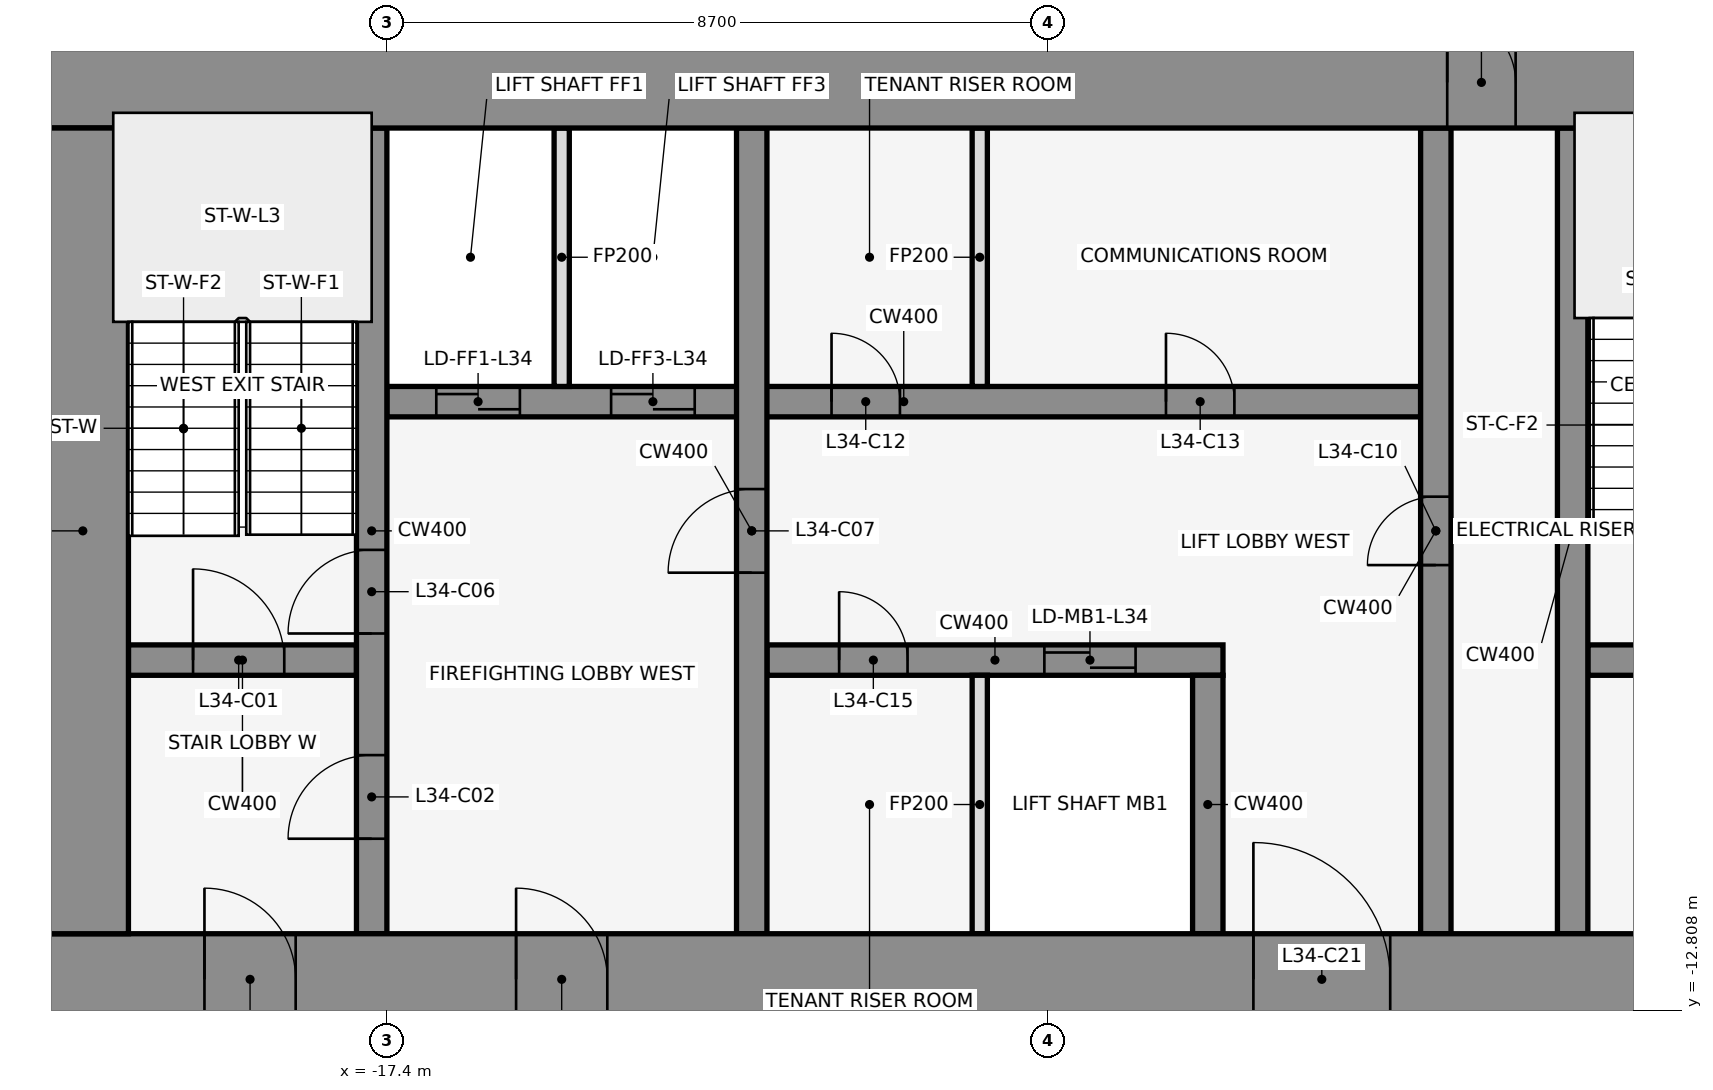
"""IFC4 building model, lengths in metres.
Left out: names, types, materials, properties, quantities, classifications, styles, units other than length and angle.
Written with IfcOpenShell. Run it as: python <this file> out.ifc"""

import sys

from ifc_helpers import new_model, si_unit, direction, frame, frame_2d, origin, place, context, subcontext, project, spatial, rectangle, extrude, element, fill, save


model = new_model("IFC4")
c1 = context("Model", 3, precision=1e-05, world=origin(), true_north=direction((0.0, 1.0)))
c2 = subcontext(c1, "Body", "Model", "MODEL_VIEW")
j1 = project(units=[si_unit("LENGTHUNIT", "METRE"), si_unit("PLANEANGLEUNIT", "RADIAN")], contexts=[c1])
p1 = place(None, origin())
s1 = spatial("IfcSite", under=j1, at=p1, CompositionType="ELEMENT")
p2 = place(p1, origin())
s2 = spatial("IfcBuilding", under=s1, at=p2, CompositionType="ELEMENT")
p3 = place(p2, frame((0.0, 0.0, 156.8)))
s3 = spatial("IfcBuildingStorey", under=s2, at=p3, CompositionType="ELEMENT", Elevation=156.8)
for number, where, z_axis, x_axis in (
    (1, (-0.068, -0.105, 0.0), (0.0, 0.0, 1.0), (-0.84, 0.543, 0.0)),
    (2, (-14.599, 1.08, 0.0), (0.0, 0.0, 1.0), (-0.84, -0.543, 0.0)),
):
    element("IfcWall", number, at=place(p3, frame(where, z_axis=z_axis, x_axis=x_axis)), inside=s3, PredefinedType="STANDARD", context=c2, shape_type="SweptSolid", body=[
        extrude(rectangle(XDim=2.183, YDim=0.25, at=frame_2d((1.091, 0.0))), origin(), (0.0, 0.0, 1.0), 3.95),
    ])
p4 = place(p3, frame((-20.8, -8.2, 0.0), z_axis=(0.0, 0.0, 1.0), x_axis=(1.0, 0.0, 0.0)))
e3 = element("IfcWall", 3, at=p4, inside=s3, PredefinedType="SHEAR", context=c2, shape_type="SweptSolid", body=[
    extrude(rectangle(XDim=3.0, YDim=0.4, at=frame_2d((1.5, 0.0))), origin(), (0.0, 0.0, 1.0), 4.1),
])
p5 = place(p4, frame((0.85, 0.0, 0.0)))
e4 = element("IfcOpeningElement", 4, at=p5, cuts=e3, PredefinedType="OPENING", context=c2, shape_type="SweptSolid", body=[
    extrude(rectangle(XDim=1.2, YDim=2.1, at=frame_2d((0.6, 1.05))), frame((0.0, 0.212, 0.0), z_axis=(0.0, -1.0, 0.0), x_axis=(1.0, 0.0, 0.0)), (0.0, 0.0, 1.0), 0.424),
])
p6 = place(p3, frame((-12.4, -8.2, 0.0), z_axis=(0.0, 0.0, 1.0), x_axis=(1.0, 0.0, 0.0)))
e5 = element("IfcWall", 5, at=p6, inside=s3, PredefinedType="SHEAR", context=c2, shape_type="SweptSolid", body=[
    extrude(rectangle(XDim=6.0, YDim=0.4, at=frame_2d((3.0, 0.0))), origin(), (0.0, 0.0, 1.0), 4.1),
])
p7 = place(p6, frame((3.65, 0.0, 0.0)))
e6 = element("IfcOpeningElement", 6, at=p7, cuts=e5, PredefinedType="OPENING", context=c2, shape_type="SweptSolid", body=[
    extrude(rectangle(XDim=1.2, YDim=2.1, at=frame_2d((0.6, 1.05))), frame((0.0, 0.212, 0.0), z_axis=(0.0, -1.0, 0.0), x_axis=(1.0, 0.0, 0.0)), (0.0, 0.0, 1.0), 0.424),
])
p8 = place(p6, frame((0.95, 0.0, 0.0)))
e7 = element("IfcOpeningElement", 7, at=p8, cuts=e5, PredefinedType="OPENING", context=c2, shape_type="SweptSolid", body=[
    extrude(rectangle(XDim=0.9, YDim=2.1, at=frame_2d((0.45, 1.05))), frame((0.0, 0.212, 0.0), z_axis=(0.0, -1.0, 0.0), x_axis=(1.0, 0.0, 0.0)), (0.0, 0.0, 1.0), 0.424),
])
p9 = place(p3, frame((-1.6, -8.2, 0.0), z_axis=(0.0, 0.0, 1.0), x_axis=(1.0, 0.0, 0.0)))
e8 = element("IfcWall", 8, at=p9, inside=s3, PredefinedType="SHEAR", context=c2, shape_type="SweptSolid", body=[
    extrude(rectangle(XDim=3.2, YDim=0.4, at=frame_2d((1.6, 0.0))), origin(), (0.0, 0.0, 1.0), 4.1),
])
p10 = place(p9, frame((1.05, 0.0, 0.0)))
e9 = element("IfcOpeningElement", 9, at=p10, cuts=e8, PredefinedType="OPENING", context=c2, shape_type="SweptSolid", body=[
    extrude(rectangle(XDim=1.2, YDim=2.1, at=frame_2d((0.6, 1.05))), frame((0.0, 0.212, 0.0), z_axis=(0.0, -1.0, 0.0), x_axis=(1.0, 0.0, 0.0)), (0.0, 0.0, 1.0), 0.424),
])
p11 = place(p3, frame((-17.4, -4.8, 0.0), z_axis=(0.0, 0.0, 1.0), x_axis=(1.0, 0.0, 0.0)))
e10 = element("IfcWall", 10, at=p11, inside=s3, PredefinedType="SHEAR", context=c2, shape_type="SweptSolid", body=[
    extrude(rectangle(XDim=13.6, YDim=0.4, at=frame_2d((6.8, 0.0))), origin(), (0.0, 0.0, 1.0), 4.1),
])
p12 = place(p11, frame((0.65, 0.0, 0.0)))
e11 = element("IfcOpeningElement", 11, at=p12, cuts=e10, PredefinedType="OPENING", context=c2, shape_type="SweptSolid", body=[
    extrude(rectangle(XDim=1.1, YDim=2.1, at=frame_2d((0.55, 1.05))), frame((0.0, 0.212, 0.0), z_axis=(0.0, -1.0, 0.0), x_axis=(1.0, 0.0, 0.0)), (0.0, 0.0, 1.0), 0.424),
])
p13 = place(p11, frame((2.95, 0.0, 0.0)))
e12 = element("IfcOpeningElement", 12, at=p13, cuts=e10, PredefinedType="OPENING", context=c2, shape_type="SweptSolid", body=[
    extrude(rectangle(XDim=1.1, YDim=2.1, at=frame_2d((0.55, 1.05))), frame((0.0, 0.212, 0.0), z_axis=(0.0, -1.0, 0.0), x_axis=(1.0, 0.0, 0.0)), (0.0, 0.0, 1.0), 0.424),
])
p14 = place(p11, frame((5.85, 0.0, 0.0)))
e13 = element("IfcOpeningElement", 13, at=p14, cuts=e10, PredefinedType="OPENING", context=c2, shape_type="SweptSolid", body=[
    extrude(rectangle(XDim=0.9, YDim=2.1, at=frame_2d((0.45, 1.05))), frame((0.0, 0.212, 0.0), z_axis=(0.0, -1.0, 0.0), x_axis=(1.0, 0.0, 0.0)), (0.0, 0.0, 1.0), 0.424),
])
p15 = place(p11, frame((10.25, 0.0, 0.0)))
e14 = element("IfcOpeningElement", 14, at=p15, cuts=e10, PredefinedType="OPENING", context=c2, shape_type="SweptSolid", body=[
    extrude(rectangle(XDim=0.9, YDim=2.1, at=frame_2d((0.45, 1.05))), frame((0.0, 0.212, 0.0), z_axis=(0.0, -1.0, 0.0), x_axis=(1.0, 0.0, 0.0)), (0.0, 0.0, 1.0), 0.424),
])
p16 = place(p3, frame((-17.6, -11.8, 0.0), z_axis=(0.0, 0.0, 1.0), x_axis=(0.0, 1.0, 0.0)))
e15 = element("IfcWall", 15, at=p16, inside=s3, PredefinedType="SHEAR", context=c2, shape_type="SweptSolid", body=[
    extrude(rectangle(XDim=10.6, YDim=0.4, at=frame_2d((5.3, 0.0))), origin(), (0.0, 0.0, 1.0), 4.1),
])
p17 = place(p16, frame((1.25, 0.0, 0.0)))
e16 = element("IfcOpeningElement", 16, at=p17, cuts=e15, PredefinedType="OPENING", context=c2, shape_type="SweptSolid", body=[
    extrude(rectangle(XDim=1.1, YDim=2.1, at=frame_2d((0.55, 1.05))), frame((0.0, 0.212, 0.0), z_axis=(0.0, -1.0, 0.0), x_axis=(1.0, 0.0, 0.0)), (0.0, 0.0, 1.0), 0.424),
])
p18 = place(p16, frame((3.95, 0.0, 0.0)))
e17 = element("IfcOpeningElement", 17, at=p18, cuts=e15, PredefinedType="OPENING", context=c2, shape_type="SweptSolid", body=[
    extrude(rectangle(XDim=1.1, YDim=2.1, at=frame_2d((0.55, 1.05))), frame((0.0, 0.212, 0.0), z_axis=(0.0, -1.0, 0.0), x_axis=(1.0, 0.0, 0.0)), (0.0, 0.0, 1.0), 0.424),
])
p19 = place(p3, frame((-15.1, -4.6, 0.0), z_axis=(0.0, 0.0, 1.0), x_axis=(0.0, 1.0, 0.0)))
e18 = element("IfcWall", 18, at=p19, inside=s3, PredefinedType="PARTITIONING", context=c2, shape_type="SweptSolid", body=[
    extrude(rectangle(XDim=3.4, YDim=0.2, at=frame_2d((1.7, 0.0))), origin(), (0.0, 0.0, 1.0), 2.84),
])
p20 = place(p3, frame((-12.6, -11.8, 0.0), z_axis=(0.0, 0.0, 1.0), x_axis=(0.0, 1.0, 0.0)))
e19 = element("IfcWall", 19, at=p20, inside=s3, PredefinedType="SHEAR", context=c2, shape_type="SweptSolid", body=[
    extrude(rectangle(XDim=10.6, YDim=0.4, at=frame_2d((5.3, 0.0))), origin(), (0.0, 0.0, 1.0), 4.1),
])
p21 = place(p20, frame((4.75, 0.0, 0.0)))
e20 = element("IfcOpeningElement", 20, at=p21, cuts=e19, PredefinedType="OPENING", context=c2, shape_type="SweptSolid", body=[
    extrude(rectangle(XDim=1.1, YDim=2.1, at=frame_2d((0.55, 1.05))), frame((0.0, 0.212, 0.0), z_axis=(0.0, -1.0, 0.0), x_axis=(1.0, 0.0, 0.0)), (0.0, 0.0, 1.0), 0.424),
])
for number, where, z_axis, x_axis in (
    (21, (-9.6, -11.8, 0.0), (0.0, 0.0, 1.0), (0.0, 1.0, 0.0)),
    (22, (-9.6, -4.6, 0.0), (0.0, 0.0, 1.0), (0.0, 1.0, 0.0)),
):
    element("IfcWall", number, at=place(p3, frame(where, z_axis=z_axis, x_axis=x_axis)), inside=s3, PredefinedType="PARTITIONING", context=c2, shape_type="SweptSolid", body=[
        extrude(rectangle(XDim=3.4, YDim=0.2, at=frame_2d((1.7, 0.0))), origin(), (0.0, 0.0, 1.0), 2.84),
    ])
p22 = place(p3, frame((-6.6, -11.8, 0.0), z_axis=(0.0, 0.0, 1.0), x_axis=(0.0, 1.0, 0.0)))
e23 = element("IfcWall", 23, at=p22, inside=s3, PredefinedType="SHEAR", context=c2, shape_type="SweptSolid", body=[
    extrude(rectangle(XDim=3.4, YDim=0.4, at=frame_2d((1.7, 0.0))), origin(), (0.0, 0.0, 1.0), 4.1),
])
p23 = place(p3, frame((-3.6, -11.8, 0.0), z_axis=(0.0, 0.0, 1.0), x_axis=(0.0, 1.0, 0.0)))
e24 = element("IfcWall", 24, at=p23, inside=s3, PredefinedType="SHEAR", context=c2, shape_type="SweptSolid", body=[
    extrude(rectangle(XDim=10.6, YDim=0.4, at=frame_2d((5.3, 0.0))), origin(), (0.0, 0.0, 1.0), 4.1),
])
p24 = place(p23, frame((4.85, 0.0, 0.0)))
e25 = element("IfcOpeningElement", 25, at=p24, cuts=e24, PredefinedType="OPENING", context=c2, shape_type="SweptSolid", body=[
    extrude(rectangle(XDim=0.9, YDim=2.1, at=frame_2d((0.45, 1.05))), frame((0.0, 0.212, 0.0), z_axis=(0.0, -1.0, 0.0), x_axis=(1.0, 0.0, 0.0)), (0.0, 0.0, 1.0), 0.424),
])
p25 = place(p3, frame((-1.8, -11.8, 0.0), z_axis=(0.0, 0.0, 1.0), x_axis=(0.0, 1.0, 0.0)))
e26 = element("IfcWall", 26, at=p25, inside=s3, PredefinedType="SHEAR", context=c2, shape_type="SweptSolid", body=[
    extrude(rectangle(XDim=10.6, YDim=0.4, at=frame_2d((5.3, 0.0))), origin(), (0.0, 0.0, 1.0), 4.1),
])
p26 = place(p3, frame((-22.0, -0.6, 0.0), z_axis=(0.0, 0.0, 1.0), x_axis=(1.0, 0.0, 0.0)))
e27 = element("IfcWall", 27, at=p26, inside=s3, PredefinedType="SHEAR", context=c2, shape_type="SweptSolid", body=[
    extrude(rectangle(XDim=44.0, YDim=1.2, at=frame_2d((22.0, 0.0))), origin(), (0.0, 0.0, 1.0), 4.1),
])
p27 = place(p26, frame((18.55, 0.0, 0.0)))
e28 = element("IfcOpeningElement", 28, at=p27, cuts=e27, PredefinedType="OPENING", context=c2, shape_type="SweptSolid", body=[
    extrude(rectangle(XDim=0.9, YDim=2.1, at=frame_2d((0.45, 1.05))), frame((0.0, 0.612, 0.0), z_axis=(0.0, -1.0, 0.0), x_axis=(1.0, 0.0, 0.0)), (0.0, 0.0, 1.0), 1.224),
])
p28 = place(p26, frame((24.55, 0.0, 0.0)))
e29 = element("IfcOpeningElement", 29, at=p28, cuts=e27, PredefinedType="OPENING", context=c2, shape_type="SweptSolid", body=[
    extrude(rectangle(XDim=0.9, YDim=2.1, at=frame_2d((0.45, 1.05))), frame((0.0, 0.612, 0.0), z_axis=(0.0, -1.0, 0.0), x_axis=(1.0, 0.0, 0.0)), (0.0, 0.0, 1.0), 1.224),
])
p29 = place(p3, frame((-22.0, -12.4, 0.0), z_axis=(0.0, 0.0, 1.0), x_axis=(1.0, 0.0, 0.0)))
e30 = element("IfcWall", 30, at=p29, inside=s3, PredefinedType="SHEAR", context=c2, shape_type="SweptSolid", body=[
    extrude(rectangle(XDim=44.0, YDim=1.2, at=frame_2d((22.0, 0.0))), origin(), (0.0, 0.0, 1.0), 4.1),
])
p30 = place(p29, frame((2.2, 0.0, 0.0)))
e31 = element("IfcOpeningElement", 31, at=p30, cuts=e30, PredefinedType="OPENING", context=c2, shape_type="SweptSolid", body=[
    extrude(rectangle(XDim=1.2, YDim=2.1, at=frame_2d((0.6, 1.05))), frame((0.0, 0.612, 0.0), z_axis=(0.0, -1.0, 0.0), x_axis=(1.0, 0.0, 0.0)), (0.0, 0.0, 1.0), 1.224),
])
p31 = place(p29, frame((21.4, 0.0, 0.0)))
e32 = element("IfcOpeningElement", 32, at=p31, cuts=e30, PredefinedType="OPENING", context=c2, shape_type="SweptSolid", body=[
    extrude(rectangle(XDim=1.2, YDim=2.1, at=frame_2d((0.6, 1.05))), frame((0.0, 0.612, 0.0), z_axis=(0.0, -1.0, 0.0), x_axis=(1.0, 0.0, 0.0)), (0.0, 0.0, 1.0), 1.224),
])
p32 = place(p29, frame((40.6, 0.0, 0.0)))
e33 = element("IfcOpeningElement", 33, at=p32, cuts=e30, PredefinedType="OPENING", context=c2, shape_type="SweptSolid", body=[
    extrude(rectangle(XDim=1.2, YDim=2.1, at=frame_2d((0.6, 1.05))), frame((0.0, 0.612, 0.0), z_axis=(0.0, -1.0, 0.0), x_axis=(1.0, 0.0, 0.0)), (0.0, 0.0, 1.0), 1.224),
])
p33 = place(p29, frame((16.0, 0.0, 0.0)))
e34 = element("IfcOpeningElement", 34, at=p33, cuts=e30, PredefinedType="OPENING", context=c2, shape_type="SweptSolid", body=[
    extrude(rectangle(XDim=1.8, YDim=2.1, at=frame_2d((0.9, 1.05))), frame((0.0, 0.612, 0.0), z_axis=(0.0, -1.0, 0.0), x_axis=(1.0, 0.0, 0.0)), (0.0, 0.0, 1.0), 1.224),
])
p34 = place(p29, frame((6.3, 0.0, 0.0)))
e35 = element("IfcOpeningElement", 35, at=p34, cuts=e30, PredefinedType="OPENING", context=c2, shape_type="SweptSolid", body=[
    extrude(rectangle(XDim=1.2, YDim=2.1, at=frame_2d((0.6, 1.05))), frame((0.0, 0.612, 0.0), z_axis=(0.0, -1.0, 0.0), x_axis=(1.0, 0.0, 0.0)), (0.0, 0.0, 1.0), 1.224),
])
p35 = place(p29, frame((26.2, 0.0, 0.0)))
e36 = element("IfcOpeningElement", 36, at=p35, cuts=e30, PredefinedType="OPENING", context=c2, shape_type="SweptSolid", body=[
    extrude(rectangle(XDim=1.8, YDim=2.1, at=frame_2d((0.9, 1.05))), frame((0.0, 0.612, 0.0), z_axis=(0.0, -1.0, 0.0), x_axis=(1.0, 0.0, 0.0)), (0.0, 0.0, 1.0), 1.224),
])
p36 = place(p29, frame((36.5, 0.0, 0.0)))
e37 = element("IfcOpeningElement", 37, at=p36, cuts=e30, PredefinedType="OPENING", context=c2, shape_type="SweptSolid", body=[
    extrude(rectangle(XDim=1.2, YDim=2.1, at=frame_2d((0.6, 1.05))), frame((0.0, 0.612, 0.0), z_axis=(0.0, -1.0, 0.0), x_axis=(1.0, 0.0, 0.0)), (0.0, 0.0, 1.0), 1.224),
])
p37 = place(p3, frame((-21.4, -11.8, 0.0), z_axis=(0.0, 0.0, 1.0), x_axis=(0.0, 1.0, 0.0)))
e38 = element("IfcWall", 38, at=p37, inside=s3, PredefinedType="SHEAR", context=c2, shape_type="SweptSolid", body=[
    extrude(rectangle(XDim=10.6, YDim=1.2, at=frame_2d((5.3, 0.0))), origin(), (0.0, 0.0, 1.0), 4.1),
])
p38 = place(p5, origin())
e39 = element("IfcDoor", 39, at=p38, inside=s3, OperationType="SINGLE_SWING_LEFT", PredefinedType="DOOR", context=c2, shape_type="SweptSolid", body=[
    extrude(rectangle(XDim=1.2, YDim=2.1, at=frame_2d((0.6, 1.05))), frame((0.0, 0.025, 0.0), z_axis=(0.0, -1.0, 0.0), x_axis=(1.0, 0.0, 0.0)), (0.0, 0.0, 1.0), 0.05),
])
fill(e4, e39)
p39 = place(p17, frame((1.1, 0.0, 0.0), z_axis=(0.0, 0.0, 1.0), x_axis=(-1.0, 0.0, 0.0)))
e40 = element("IfcDoor", 40, at=p39, inside=s3, OperationType="SINGLE_SWING_LEFT", PredefinedType="DOOR", context=c2, shape_type="SweptSolid", body=[
    extrude(rectangle(XDim=1.1, YDim=2.1, at=frame_2d((0.55, 1.05))), frame((0.0, 0.025, 0.0), z_axis=(0.0, -1.0, 0.0), x_axis=(1.0, 0.0, 0.0)), (0.0, 0.0, 1.0), 0.05),
])
fill(e16, e40)
p40 = place(p12, origin())
e41 = element("IfcDoor", 41, at=p40, inside=s3, OperationType="DOUBLE_DOOR_SLIDING", PredefinedType="DOOR", context=c2, shape_type="SweptSolid", body=[
    extrude(rectangle(XDim=1.1, YDim=2.1, at=frame_2d((0.55, 1.05))), frame((0.0, 0.025, 0.0), z_axis=(0.0, -1.0, 0.0), x_axis=(1.0, 0.0, 0.0)), (0.0, 0.0, 1.0), 0.05),
])
fill(e11, e41)
p41 = place(p13, origin())
e42 = element("IfcDoor", 42, at=p41, inside=s3, OperationType="DOUBLE_DOOR_SLIDING", PredefinedType="DOOR", context=c2, shape_type="SweptSolid", body=[
    extrude(rectangle(XDim=1.1, YDim=2.1, at=frame_2d((0.55, 1.05))), frame((0.0, 0.025, 0.0), z_axis=(0.0, -1.0, 0.0), x_axis=(1.0, 0.0, 0.0)), (0.0, 0.0, 1.0), 0.05),
])
fill(e12, e42)
p42 = place(p7, origin())
e43 = element("IfcDoor", 43, at=p42, inside=s3, OperationType="DOUBLE_DOOR_SLIDING", PredefinedType="DOOR", context=c2, shape_type="SweptSolid", body=[
    extrude(rectangle(XDim=1.2, YDim=2.1, at=frame_2d((0.6, 1.05))), frame((0.0, 0.025, 0.0), z_axis=(0.0, -1.0, 0.0), x_axis=(1.0, 0.0, 0.0)), (0.0, 0.0, 1.0), 0.05),
])
fill(e6, e43)
p43 = place(p18, frame((1.1, 0.0, 0.0), z_axis=(0.0, 0.0, 1.0), x_axis=(-1.0, 0.0, 0.0)))
e44 = element("IfcDoor", 44, at=p43, inside=s3, OperationType="SINGLE_SWING_LEFT", PredefinedType="DOOR", context=c2, shape_type="SweptSolid", body=[
    extrude(rectangle(XDim=1.1, YDim=2.1, at=frame_2d((0.55, 1.05))), frame((0.0, 0.025, 0.0), z_axis=(0.0, -1.0, 0.0), x_axis=(1.0, 0.0, 0.0)), (0.0, 0.0, 1.0), 0.05),
])
fill(e17, e44)
p44 = place(p21, origin())
e45 = element("IfcDoor", 45, at=p44, inside=s3, OperationType="SINGLE_SWING_LEFT", PredefinedType="DOOR", context=c2, shape_type="SweptSolid", body=[
    extrude(rectangle(XDim=1.1, YDim=2.1, at=frame_2d((0.55, 1.05))), frame((0.0, 0.025, 0.0), z_axis=(0.0, -1.0, 0.0), x_axis=(1.0, 0.0, 0.0)), (0.0, 0.0, 1.0), 0.05),
])
fill(e20, e45)
p45 = place(p24, frame((0.9, 0.0, 0.0), z_axis=(0.0, 0.0, 1.0), x_axis=(-1.0, 0.0, 0.0)))
e46 = element("IfcDoor", 46, at=p45, inside=s3, OperationType="SINGLE_SWING_LEFT", PredefinedType="DOOR", context=c2, shape_type="SweptSolid", body=[
    extrude(rectangle(XDim=0.9, YDim=2.1, at=frame_2d((0.45, 1.05))), frame((0.0, 0.025, 0.0), z_axis=(0.0, -1.0, 0.0), x_axis=(1.0, 0.0, 0.0)), (0.0, 0.0, 1.0), 0.05),
])
fill(e25, e46)
p46 = place(p14, origin())
e47 = element("IfcDoor", 47, at=p46, inside=s3, OperationType="SINGLE_SWING_RIGHT", PredefinedType="DOOR", context=c2, shape_type="SweptSolid", body=[
    extrude(rectangle(XDim=0.9, YDim=2.1, at=frame_2d((0.45, 1.05))), frame((0.0, 0.025, 0.0), z_axis=(0.0, -1.0, 0.0), x_axis=(1.0, 0.0, 0.0)), (0.0, 0.0, 1.0), 0.05),
])
fill(e13, e47)
p47 = place(p15, origin())
e48 = element("IfcDoor", 48, at=p47, inside=s3, OperationType="SINGLE_SWING_LEFT", PredefinedType="DOOR", context=c2, shape_type="SweptSolid", body=[
    extrude(rectangle(XDim=0.9, YDim=2.1, at=frame_2d((0.45, 1.05))), frame((0.0, 0.025, 0.0), z_axis=(0.0, -1.0, 0.0), x_axis=(1.0, 0.0, 0.0)), (0.0, 0.0, 1.0), 0.05),
])
fill(e14, e48)
p48 = place(p8, frame((0.9, 0.0, 0.0), z_axis=(0.0, 0.0, 1.0), x_axis=(-1.0, 0.0, 0.0)))
e49 = element("IfcDoor", 49, at=p48, inside=s3, OperationType="SINGLE_SWING_RIGHT", PredefinedType="DOOR", context=c2, shape_type="SweptSolid", body=[
    extrude(rectangle(XDim=0.9, YDim=2.1, at=frame_2d((0.45, 1.05))), frame((0.0, 0.025, 0.0), z_axis=(0.0, -1.0, 0.0), x_axis=(1.0, 0.0, 0.0)), (0.0, 0.0, 1.0), 0.05),
])
fill(e7, e49)
p49 = place(p27, origin())
e50 = element("IfcDoor", 50, at=p49, inside=s3, OperationType="SINGLE_SWING_LEFT", PredefinedType="DOOR", context=c2, shape_type="SweptSolid", body=[
    extrude(rectangle(XDim=0.9, YDim=2.1, at=frame_2d((0.45, 1.05))), frame((0.0, 0.025, 0.0), z_axis=(0.0, -1.0, 0.0), x_axis=(1.0, 0.0, 0.0)), (0.0, 0.0, 1.0), 0.05),
])
fill(e28, e50)
p50 = place(p30, frame((1.2, 0.0, 0.0), z_axis=(0.0, 0.0, 1.0), x_axis=(-1.0, 0.0, 0.0)))
e51 = element("IfcDoor", 51, at=p50, inside=s3, OperationType="SINGLE_SWING_RIGHT", PredefinedType="DOOR", context=c2, shape_type="SweptSolid", body=[
    extrude(rectangle(XDim=1.2, YDim=2.1, at=frame_2d((0.6, 1.05))), frame((0.0, 0.025, 0.0), z_axis=(0.0, -1.0, 0.0), x_axis=(1.0, 0.0, 0.0)), (0.0, 0.0, 1.0), 0.05),
])
fill(e31, e51)
p51 = place(p33, origin())
e52 = element("IfcDoor", 52, at=p51, inside=s3, OperationType="SINGLE_SWING_LEFT", PredefinedType="DOOR", context=c2, shape_type="SweptSolid", body=[
    extrude(rectangle(XDim=1.8, YDim=2.1, at=frame_2d((0.9, 1.05))), frame((0.0, 0.025, 0.0), z_axis=(0.0, -1.0, 0.0), x_axis=(1.0, 0.0, 0.0)), (0.0, 0.0, 1.0), 0.05),
])
fill(e34, e52)
p52 = place(p34, frame((1.2, 0.0, 0.0), z_axis=(0.0, 0.0, 1.0), x_axis=(-1.0, 0.0, 0.0)))
e53 = element("IfcDoor", 53, at=p52, inside=s3, OperationType="SINGLE_SWING_RIGHT", PredefinedType="DOOR", context=c2, shape_type="SweptSolid", body=[
    extrude(rectangle(XDim=1.2, YDim=2.1, at=frame_2d((0.6, 1.05))), frame((0.0, 0.025, 0.0), z_axis=(0.0, -1.0, 0.0), x_axis=(1.0, 0.0, 0.0)), (0.0, 0.0, 1.0), 0.05),
])
fill(e35, e53)
save(model, sys.argv[1])
